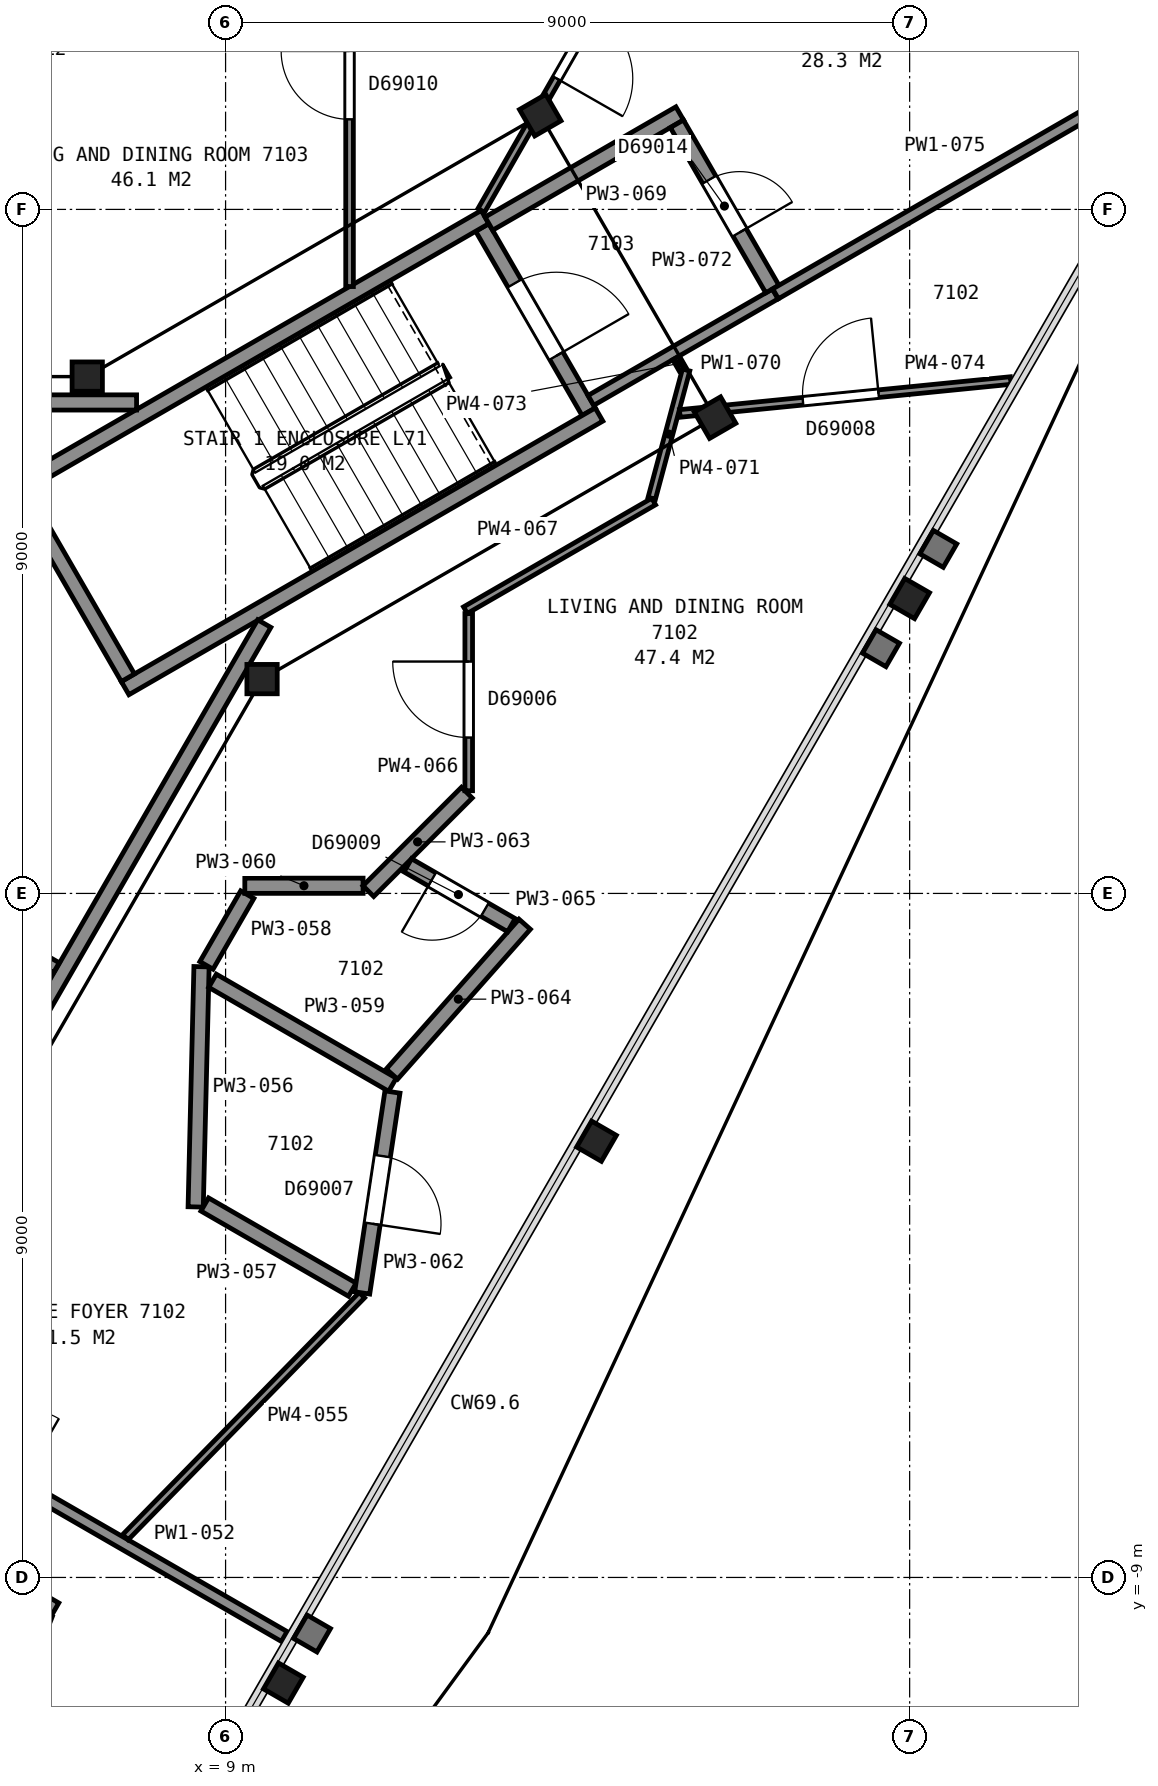
"""IFC4 building model, lengths in metres.
Left out: names, types, materials, properties, quantities, classifications, styles, units other than length and angle.
Written with IfcOpenShell. Run it as: python <this file> out.ifc"""

import sys

from ifc_helpers import new_model, si_unit, direction, frame, frame_2d, origin, origin_2d, place, context, subcontext, project, spatial, rectangle, i_section, extrude, element, fill, save


model = new_model("IFC4")
c1 = context("Model", 3, precision=1e-05, world=origin(), true_north=direction((0.0, 1.0)))
c2 = subcontext(c1, "Body", "Model", "MODEL_VIEW")
j1 = project(units=[si_unit("LENGTHUNIT", "METRE"), si_unit("PLANEANGLEUNIT", "RADIAN")], contexts=[c1])
p1 = place(None, origin())
s1 = spatial("IfcSite", under=j1, at=p1, CompositionType="ELEMENT")
p2 = place(p1, origin())
s2 = spatial("IfcBuilding", under=s1, at=p2, CompositionType="ELEMENT")
p3 = place(p2, frame((0.0, 0.0, 282.5)))
s3 = spatial("IfcBuildingStorey", under=s2, at=p3, CompositionType="ELEMENT", Elevation=282.5)
for number, where, z_axis, x_axis in (
    (1, (9.76, -10.39, 0.0), (0.0, 0.0, 1.0), (-0.5, -0.866, 0.0)),
    (2, (13.88, -3.26, 0.0), (0.0, 0.0, 1.0), (-0.5, -0.866, 0.0)),
    (3, (18.0, 3.88, 0.0), (0.0, 0.0, 1.0), (-0.5, -0.866, 0.0)),
):
    element("IfcColumn", number, at=place(p3, frame(where, z_axis=z_axis, x_axis=x_axis)), inside=s3, PredefinedType="COLUMN", context=c2, shape_type="SweptSolid", body=[
        extrude(i_section(OverallWidth=0.394, OverallDepth=0.376, WebThickness=0.017, FlangeThickness=0.028, FilletRadius=0.015, at=origin_2d()), origin(), (0.0, 0.0, 1.0), 3.7),
    ])
p4 = place(p3, frame((9.48, 2.82, 0.0), z_axis=(0.0, 0.0, 1.0), x_axis=(1.0, 0.0, 0.0)))
e4 = element("IfcColumn", 4, at=p4, inside=s3, PredefinedType="COLUMN", context=c2, shape_type="SweptSolid", body=[
    extrude(i_section(OverallWidth=0.399, OverallDepth=0.386, WebThickness=0.021, FlangeThickness=0.033, FilletRadius=0.015, at=origin_2d()), origin(), (0.0, 0.0, 1.0), 3.7),
])
for number, where, z_axis, x_axis in (
    (5, (15.44, 6.26, 0.0), (0.0, 0.0, 1.0), (0.5, -0.866, 0.0)),
    (6, (13.14, 10.24, 0.0), (0.0, 0.0, 1.0), (0.5, -0.866, 0.0)),
):
    element("IfcColumn", number, at=place(p3, frame(where, z_axis=z_axis, x_axis=x_axis)), inside=s3, PredefinedType="COLUMN", context=c2, shape_type="SweptSolid", body=[
        extrude(i_section(OverallWidth=0.401, OverallDepth=0.399, WebThickness=0.025, FlangeThickness=0.04, FilletRadius=0.015, at=origin_2d()), origin(), (0.0, 0.0, 1.0), 3.7),
    ])
p5 = place(p3, frame((7.18, 6.8, 0.0), z_axis=(0.0, 0.0, 1.0), x_axis=(1.0, 0.0, 0.0)))
e7 = element("IfcColumn", 7, at=p5, inside=s3, PredefinedType="COLUMN", context=c2, shape_type="SweptSolid", body=[
    extrude(i_section(OverallWidth=0.399, OverallDepth=0.386, WebThickness=0.021, FlangeThickness=0.033, FilletRadius=0.015, at=origin_2d()), origin(), (0.0, 0.0, 1.0), 3.7),
])
p6 = place(p3, frame((13.777, 6.338, 0.0), z_axis=(0.0, 0.0, 1.0), x_axis=(-0.500049511043, 0.865996816683, 0.0)))
e8 = element("IfcWall", 8, at=p6, inside=s3, PredefinedType="PARTITIONING", context=c2, shape_type="SweptSolid", body=[
    extrude(rectangle(XDim=2.8, YDim=0.2, at=frame_2d((1.4, 0.0))), origin(), (0.0, 0.0, 1.0), 3.45),
])
p7 = place(p6, frame((0.85, 0.0, 0.0)))
e9 = element("IfcOpeningElement", 9, at=p7, cuts=e8, PredefinedType="OPENING", context=c2, shape_type="SweptSolid", body=[
    extrude(rectangle(XDim=1.1, YDim=2.1, at=frame_2d((0.55, 1.05))), frame((0.0, 0.11, 0.0), z_axis=(0.0, -1.0, 0.0), x_axis=(1.0, 0.0, 0.0)), (0.0, 0.0, 1.0), 0.22),
])
for number, where, z_axis, x_axis in (
    (10, (6.178, 5.299, 0.0), (0.0, 0.0, 1.0), (0.866, 0.5, 0.0)),
    (11, (7.678, 2.701, 0.0), (0.0, 0.0, 1.0), (0.866, 0.5, 0.0)),
):
    element("IfcWall", number, at=place(p3, frame(where, z_axis=z_axis, x_axis=x_axis)), inside=s3, PredefinedType="PARTITIONING", context=c2, shape_type="SweptSolid", body=[
        extrude(rectangle(XDim=7.2, YDim=0.2, at=frame_2d((3.6, 0.0))), origin(), (0.0, 0.0, 1.0), 3.45),
    ])
p8 = place(p3, frame((7.715, 2.838, 0.0), z_axis=(0.0, 0.0, 1.0), x_axis=(-0.500049511043, 0.865996816683, 0.0)))
e12 = element("IfcWall", 12, at=p8, inside=s3, PredefinedType="PARTITIONING", context=c2, shape_type="SweptSolid", body=[
    extrude(rectangle(XDim=2.8, YDim=0.2, at=frame_2d((1.4, 0.0))), origin(), (0.0, 0.0, 1.0), 3.45),
])
p9 = place(p3, frame((7.829, 6.46, 0.0), z_axis=(0.0, 0.0, 1.0), x_axis=(-1.0, 0.0, 0.0)))
e13 = element("IfcWall", 13, at=p9, inside=s3, PredefinedType="PARTITIONING", context=c2, shape_type="SweptSolid", body=[
    extrude(rectangle(XDim=15.658, YDim=0.2, at=frame_2d((7.829, 0.0))), origin(), (0.0, 0.0, 1.0), 3.45),
])
p10 = place(p9, frame((12.168, 0.0, 0.0)))
e14 = element("IfcOpeningElement", 14, at=p10, cuts=e13, PredefinedType="OPENING", context=c2, shape_type="SweptSolid", body=[
    extrude(rectangle(XDim=1.2, YDim=2.1, at=frame_2d((0.6, 1.05))), frame((0.0, 0.11, 0.0), z_axis=(0.0, -1.0, 0.0), x_axis=(1.0, 0.0, 0.0)), (0.0, 0.0, 1.0), 0.22),
])
p11 = place(p3, frame((3.828, -6.29, 0.0), z_axis=(0.0, 0.0, 1.0), x_axis=(0.499979739078, 0.866037101117, 0.0)))
e15 = element("IfcWall", 15, at=p11, inside=s3, PredefinedType="PARTITIONING", context=c2, shape_type="SweptSolid", body=[
    extrude(rectangle(XDim=11.363, YDim=0.2, at=frame_2d((5.681, 0.0))), origin(), (0.0, 0.0, 1.0), 3.45),
])
p12 = place(p11, frame((0.55, 0.0, 0.0)))
e16 = element("IfcOpeningElement", 16, at=p12, cuts=e15, PredefinedType="OPENING", context=c2, shape_type="SweptSolid", body=[
    extrude(rectangle(XDim=1.2, YDim=2.1, at=frame_2d((0.6, 1.05))), frame((0.0, 0.11, 0.0), z_axis=(0.0, -1.0, 0.0), x_axis=(1.0, 0.0, 0.0)), (0.0, 0.0, 1.0), 0.22),
])
p13 = place(p3, frame((6.774, -0.978, 0.0), z_axis=(0.0, 0.0, 1.0), x_axis=(-0.866062920605, 0.499935013329, 0.0)))
e17 = element("IfcWall", 17, at=p13, inside=s3, PredefinedType="PARTITIONING", context=c2, shape_type="SweptSolid", body=[
    extrude(rectangle(XDim=2.22, YDim=0.15, at=frame_2d((1.11, 0.0))), origin(), (0.0, 0.0, 1.0), 3.45),
])
p14 = place(p13, frame((0.646, 0.0, 0.0)))
e18 = element("IfcOpeningElement", 18, at=p14, cuts=e17, PredefinedType="OPENING", context=c2, shape_type="SweptSolid", body=[
    extrude(rectangle(XDim=0.9, YDim=2.1, at=frame_2d((0.45, 1.05))), frame((0.0, 0.085, 0.0), z_axis=(0.0, -1.0, 0.0), x_axis=(1.0, 0.0, 0.0)), (0.0, 0.0, 1.0), 0.17),
])
p15 = place(p3, frame((3.498, -7.541, 0.0), z_axis=(0.0, 0.0, 1.0), x_axis=(0.865985624761, -0.500068892961, 0.0)))
e19 = element("IfcWall", 19, at=p15, inside=s3, PredefinedType="PARTITIONING", context=c2, shape_type="SweptSolid", body=[
    extrude(rectangle(XDim=3.762, YDim=0.2, at=frame_2d((1.881, 0.0))), origin(), (0.0, 0.0, 1.0), 2.723),
])
p16 = place(p3, frame((9.772, -9.777, 0.0), z_axis=(0.0, 0.0, 1.0), x_axis=(-0.866083818164, 0.499898809675, 0.0)))
e20 = element("IfcWall", 20, at=p16, inside=s3, PredefinedType="PARTITIONING", context=c2, shape_type="SweptSolid", body=[
    extrude(rectangle(XDim=6.551, YDim=0.15, at=frame_2d((3.275, 0.0))), origin(), (0.0, 0.0, 1.0), 2.723),
])
p17 = place(p16, frame((4.001, 0.0, 0.0)))
e21 = element("IfcOpeningElement", 21, at=p17, cuts=e20, PredefinedType="OPENING", context=c2, shape_type="SweptSolid", body=[
    extrude(rectangle(XDim=1.0, YDim=2.1, at=frame_2d((0.5, 1.05))), frame((0.0, 0.085, 0.0), z_axis=(0.0, -1.0, 0.0), x_axis=(1.0, 0.0, 0.0)), (0.0, 0.0, 1.0), 0.17),
])
p18 = place(p3, frame((5.526, -12.29, 0.0), z_axis=(0.0, 0.0, 1.0), x_axis=(0.364786545928, 0.931091174864, 0.0)))
e22 = element("IfcWall", 22, at=p18, inside=s3, PredefinedType="PARTITIONING", context=c2, shape_type="SweptSolid", body=[
    extrude(rectangle(XDim=3.019, YDim=0.2, at=frame_2d((1.51, 0.0))), origin(), (0.0, 0.0, 1.0), 2.723),
])
p19 = place(p3, frame((7.682, -8.47, 0.0), z_axis=(0.0, 0.0, 1.0), x_axis=(0.698777378461, 0.715339203002, 0.0)))
e23 = element("IfcWall", 23, at=p19, inside=s3, PredefinedType="PARTITIONING", context=c2, shape_type="SweptSolid", body=[
    extrude(rectangle(XDim=4.452, YDim=0.1, at=frame_2d((2.226, 0.0))), origin(), (0.0, 0.0, 1.0), 2.723),
])
p20 = place(p3, frame((8.607, -4.125, 0.0), z_axis=(0.0, 0.0, 1.0), x_axis=(0.024245593124, 0.999706032399, 0.0)))
e24 = element("IfcWall", 24, at=p20, inside=s3, PredefinedType="PARTITIONING", context=c2, shape_type="SweptSolid", body=[
    extrude(rectangle(XDim=3.162, YDim=0.2, at=frame_2d((1.581, 0.0))), origin(), (0.0, 0.0, 1.0), 2.723),
])
p21 = place(p3, frame((8.726, -4.093, 0.0), z_axis=(0.0, 0.0, 1.0), x_axis=(0.866056839033, -0.499945548598, 0.0)))
e25 = element("IfcWall", 25, at=p21, inside=s3, PredefinedType="PARTITIONING", context=c2, shape_type="SweptSolid", body=[
    extrude(rectangle(XDim=2.242, YDim=0.2, at=frame_2d((1.121, 0.0))), origin(), (0.0, 0.0, 1.0), 2.723),
])
p22 = place(p3, frame((8.749, -0.947, 0.0), z_axis=(0.0, 0.0, 1.0), x_axis=(0.499656913366, 0.866223394354, 0.0)))
e26 = element("IfcWall", 26, at=p22, inside=s3, PredefinedType="PARTITIONING", context=c2, shape_type="SweptSolid", body=[
    extrude(rectangle(XDim=1.075, YDim=0.2, at=frame_2d((0.538, 0.0))), origin(), (0.0, 0.0, 1.0), 2.723),
])
p23 = place(p3, frame((8.828, -1.149, 0.0), z_axis=(0.0, 0.0, 1.0), x_axis=(0.865853899269, -0.50029693695, 0.0)))
e27 = element("IfcWall", 27, at=p23, inside=s3, PredefinedType="PARTITIONING", context=c2, shape_type="SweptSolid", body=[
    extrude(rectangle(XDim=2.734, YDim=0.2, at=frame_2d((1.367, 0.0))), origin(), (0.0, 0.0, 1.0), 2.723),
])
p24 = place(p3, frame((9.253, 0.101, 0.0), z_axis=(0.0, 0.0, 1.0), x_axis=(1.0, 0.0, 0.0)))
e28 = element("IfcWall", 28, at=p24, inside=s3, PredefinedType="PARTITIONING", context=c2, shape_type="SweptSolid", body=[
    extrude(rectangle(XDim=1.556, YDim=0.2, at=frame_2d((0.778, 0.0))), origin(), (0.0, 0.0, 1.0), 2.723),
])
p25 = place(p3, frame((10.631, 13.351, 0.0), z_axis=(0.0, 0.0, 1.0), x_axis=(0.0, -1.0, 0.0)))
e29 = element("IfcWall", 29, at=p25, inside=s3, PredefinedType="PARTITIONING", context=c2, shape_type="SweptSolid", body=[
    extrude(rectangle(XDim=5.366, YDim=0.1, at=frame_2d((2.683, 0.0))), origin(), (0.0, 0.0, 1.0), 2.723),
])
p26 = place(p25, frame((2.266, 0.0, 0.0)))
e30 = element("IfcOpeningElement", 30, at=p26, cuts=e29, PredefinedType="OPENING", context=c2, shape_type="SweptSolid", body=[
    extrude(rectangle(XDim=0.9, YDim=2.1, at=frame_2d((0.45, 1.05))), frame((0.0, 0.06, 0.0), z_axis=(0.0, -1.0, 0.0), x_axis=(1.0, 0.0, 0.0)), (0.0, 0.0, 1.0), 0.12),
])
p27 = place(p3, frame((10.797, -5.256, 0.0), z_axis=(0.0, 0.0, 1.0), x_axis=(0.148961207986, 0.988843040384, 0.0)))
e31 = element("IfcWall", 31, at=p27, inside=s3, PredefinedType="PARTITIONING", context=c2, shape_type="SweptSolid", body=[
    extrude(rectangle(XDim=2.673, YDim=0.2, at=frame_2d((1.336, 0.0))), origin(), (0.0, 0.0, 1.0), 2.723),
])
p28 = place(p27, frame((0.92, 0.0, 0.0)))
e32 = element("IfcOpeningElement", 32, at=p28, cuts=e31, PredefinedType="OPENING", context=c2, shape_type="SweptSolid", body=[
    extrude(rectangle(XDim=0.9, YDim=2.1, at=frame_2d((0.45, 1.05))), frame((0.0, 0.11, 0.0), z_axis=(0.0, -1.0, 0.0), x_axis=(1.0, 0.0, 0.0)), (0.0, 0.0, 1.0), 0.22),
])
p29 = place(p3, frame((10.878, 0.03, 0.0), z_axis=(0.0, 0.0, 1.0), x_axis=(0.707173379423, 0.707040176677, 0.0)))
e33 = element("IfcWall", 33, at=p29, inside=s3, PredefinedType="PARTITIONING", context=c2, shape_type="SweptSolid", body=[
    extrude(rectangle(XDim=1.833, YDim=0.2, at=frame_2d((0.917, 0.0))), origin(), (0.0, 0.0, 1.0), 2.723),
])
p30 = place(p3, frame((11.188, -2.377, 0.0), z_axis=(0.0, 0.0, 1.0), x_axis=(0.663045631266, 0.748578981043, 0.0)))
e34 = element("IfcWall", 34, at=p30, inside=s3, PredefinedType="PARTITIONING", context=c2, shape_type="SweptSolid", body=[
    extrude(rectangle(XDim=2.635, YDim=0.2, at=frame_2d((1.317, 0.0))), origin(), (0.0, 0.0, 1.0), 2.723),
])
p31 = place(p3, frame((12.761, -0.417, 0.0), z_axis=(0.0, 0.0, 1.0), x_axis=(-0.866030680601, 0.499990860175, 0.0)))
e35 = element("IfcWall", 35, at=p31, inside=s3, PredefinedType="PARTITIONING", context=c2, shape_type="SweptSolid", body=[
    extrude(rectangle(XDim=1.575, YDim=0.2, at=frame_2d((0.787, 0.0))), origin(), (0.0, 0.0, 1.0), 2.723),
])
p32 = place(p31, frame((0.405, 0.0, 0.0)))
e36 = element("IfcOpeningElement", 36, at=p32, cuts=e35, PredefinedType="OPENING", context=c2, shape_type="SweptSolid", body=[
    extrude(rectangle(XDim=0.8, YDim=2.1, at=frame_2d((0.4, 1.05))), frame((0.0, 0.11, 0.0), z_axis=(0.0, -1.0, 0.0), x_axis=(1.0, 0.0, 0.0)), (0.0, 0.0, 1.0), 0.22),
])
p33 = place(p3, frame((12.199, 3.682, 0.0), z_axis=(0.0, 0.0, 1.0), x_axis=(0.0, -1.0, 0.0)))
e37 = element("IfcWall", 37, at=p33, inside=s3, PredefinedType="PARTITIONING", context=c2, shape_type="SweptSolid", body=[
    extrude(rectangle(XDim=2.331, YDim=0.1, at=frame_2d((1.166, 0.0))), origin(), (0.0, 0.0, 1.0), 2.723),
])
p34 = place(p33, frame((0.631, 0.0, 0.0)))
e38 = element("IfcOpeningElement", 38, at=p34, cuts=e37, PredefinedType="OPENING", context=c2, shape_type="SweptSolid", body=[
    extrude(rectangle(XDim=1.0, YDim=2.1, at=frame_2d((0.5, 1.05))), frame((0.0, 0.06, 0.0), z_axis=(0.0, -1.0, 0.0), x_axis=(1.0, 0.0, 0.0)), (0.0, 0.0, 1.0), 0.12),
])
p35 = place(p3, frame((12.156, 3.727, 0.0), z_axis=(0.0, 0.0, 1.0), x_axis=(0.866012137121, 0.500022977831, 0.0)))
e39 = element("IfcWall", 39, at=p35, inside=s3, PredefinedType="PARTITIONING", context=c2, shape_type="SweptSolid", body=[
    extrude(rectangle(XDim=2.86, YDim=0.1, at=frame_2d((1.43, 0.0))), origin(), (0.0, 0.0, 1.0), 2.723),
])
p36 = place(p3, frame((14.868, 13.362, 0.0), z_axis=(0.0, 0.0, 1.0), x_axis=(-0.496681239155, -0.867933031214, 0.0)))
e40 = element("IfcWall", 40, at=p36, inside=s3, PredefinedType="PARTITIONING", context=c2, shape_type="SweptSolid", body=[
    extrude(rectangle(XDim=5.041, YDim=0.1, at=frame_2d((2.521, 0.0))), origin(), (0.0, 0.0, 1.0), 2.723),
])
p37 = place(p36, frame((2.041, 0.0, 0.0)))
e41 = element("IfcOpeningElement", 41, at=p37, cuts=e40, PredefinedType="OPENING", context=c2, shape_type="SweptSolid", body=[
    extrude(rectangle(XDim=1.0, YDim=2.1, at=frame_2d((0.5, 1.05))), frame((0.0, 0.06, 0.0), z_axis=(0.0, -1.0, 0.0), x_axis=(1.0, 0.0, 0.0)), (0.0, 0.0, 1.0), 0.12),
])
p38 = place(p3, frame((12.464, 8.813, 0.0), z_axis=(0.0, 0.0, 1.0), x_axis=(0.865948555758, 0.50013308107, 0.0)))
e42 = element("IfcWall", 42, at=p38, inside=s3, PredefinedType="PARTITIONING", context=c2, shape_type="SweptSolid", body=[
    extrude(rectangle(XDim=2.899, YDim=0.2, at=frame_2d((1.45, 0.0))), origin(), (0.0, 0.0, 1.0), 2.723),
])
p39 = place(p3, frame((13.806, 6.487, 0.0), z_axis=(0.0, 0.0, 1.0), x_axis=(0.866056369097, 0.49994636267, 0.0)))
e43 = element("IfcWall", 43, at=p39, inside=s3, PredefinedType="PARTITIONING", context=c2, shape_type="SweptSolid", body=[
    extrude(rectangle(XDim=2.8, YDim=0.15, at=frame_2d((1.4, 0.0))), origin(), (0.0, 0.0, 1.0), 2.723),
])
p40 = place(p3, frame((14.607, 5.2, 0.0), z_axis=(0.0, 0.0, 1.0), x_axis=(0.258549793661, 0.965997931777, 0.0)))
e44 = element("IfcWall", 44, at=p40, inside=s3, PredefinedType="PARTITIONING", context=c2, shape_type="SweptSolid", body=[
    extrude(rectangle(XDim=1.747, YDim=0.1, at=frame_2d((0.874, 0.0))), origin(), (0.0, 0.0, 1.0), 2.723),
])
p41 = place(p3, frame((16.194, 7.952, 0.0), z_axis=(0.0, 0.0, 1.0), x_axis=(-0.500039460523, 0.866002620042, 0.0)))
e45 = element("IfcWall", 45, at=p41, inside=s3, PredefinedType="PARTITIONING", context=c2, shape_type="SweptSolid", body=[
    extrude(rectangle(XDim=2.511, YDim=0.2, at=frame_2d((1.255, 0.0))), origin(), (0.0, 0.0, 1.0), 2.723),
])
p42 = place(p41, frame((0.861, 0.0, 0.0)))
e46 = element("IfcOpeningElement", 46, at=p42, cuts=e45, PredefinedType="OPENING", context=c2, shape_type="SweptSolid", body=[
    extrude(rectangle(XDim=0.8, YDim=2.1, at=frame_2d((0.4, 1.05))), frame((0.0, 0.11, 0.0), z_axis=(0.0, -1.0, 0.0), x_axis=(1.0, 0.0, 0.0)), (0.0, 0.0, 1.0), 0.22),
])
p43 = place(p3, frame((14.927, 7.047, 0.0), z_axis=(0.0, 0.0, 1.0), x_axis=(0.497687197367, -0.867356589631, 0.0)))
e47 = element("IfcWall", 47, at=p43, inside=s3, PredefinedType="PARTITIONING", context=c2, shape_type="SweptSolid", body=[
    extrude(rectangle(XDim=0.17, YDim=0.1, at=frame_2d((0.085, 0.0))), origin(), (0.0, 0.0, 1.0), 2.723),
])
p44 = place(p3, frame((14.976, 6.315, 0.0), z_axis=(0.0, 0.0, 1.0), x_axis=(0.995082940066, 0.09904515329, 0.0)))
e48 = element("IfcWall", 48, at=p44, inside=s3, PredefinedType="PARTITIONING", context=c2, shape_type="SweptSolid", body=[
    extrude(rectangle(XDim=4.375, YDim=0.1, at=frame_2d((2.188, 0.0))), origin(), (0.0, 0.0, 1.0), 2.723),
])
p45 = place(p44, frame((1.628, 0.0, 0.0)))
e49 = element("IfcOpeningElement", 49, at=p45, cuts=e48, PredefinedType="OPENING", context=c2, shape_type="SweptSolid", body=[
    extrude(rectangle(XDim=1.0, YDim=2.1, at=frame_2d((0.5, 1.05))), frame((0.0, 0.06, 0.0), z_axis=(0.0, -1.0, 0.0), x_axis=(1.0, 0.0, 0.0)), (0.0, 0.0, 1.0), 0.12),
])
p46 = place(p3, frame((16.236, 7.889, 0.0), z_axis=(0.0, 0.0, 1.0), x_axis=(0.865995456094, 0.500051867335, 0.0)))
e50 = element("IfcWall", 50, at=p46, inside=s3, PredefinedType="PARTITIONING", context=c2, shape_type="SweptSolid", body=[
    extrude(rectangle(XDim=6.415, YDim=0.15, at=frame_2d((3.208, 0.0))), origin(), (0.0, 0.0, 1.0), 2.723),
])
p47 = place(p7, origin())
e51 = element("IfcDoor", 51, at=p47, inside=s3, OperationType="SINGLE_SWING_LEFT", PredefinedType="DOOR", context=c2, shape_type="SweptSolid", body=[
    extrude(rectangle(XDim=1.1, YDim=2.1, at=frame_2d((0.55, 1.05))), frame((0.0, 0.025, 0.0), z_axis=(0.0, -1.0, 0.0), x_axis=(1.0, 0.0, 0.0)), (0.0, 0.0, 1.0), 0.05),
])
fill(e9, e51)
p48 = place(p26, origin())
e52 = element("IfcDoor", 52, at=p48, inside=s3, OperationType="SINGLE_SWING_LEFT", PredefinedType="DOOR", context=c2, shape_type="SweptSolid", body=[
    extrude(rectangle(XDim=0.9, YDim=2.1, at=frame_2d((0.45, 1.05))), frame((0.0, 0.025, 0.0), z_axis=(0.0, -1.0, 0.0), x_axis=(1.0, 0.0, 0.0)), (0.0, 0.0, 1.0), 0.05),
])
fill(e30, e52)
p49 = place(p28, origin())
e53 = element("IfcDoor", 53, at=p49, inside=s3, OperationType="SINGLE_SWING_LEFT", PredefinedType="DOOR", context=c2, shape_type="SweptSolid", body=[
    extrude(rectangle(XDim=0.9, YDim=2.1, at=frame_2d((0.45, 1.05))), frame((0.0, 0.025, 0.0), z_axis=(0.0, -1.0, 0.0), x_axis=(1.0, 0.0, 0.0)), (0.0, 0.0, 1.0), 0.05),
])
fill(e32, e53)
p50 = place(p32, origin())
e54 = element("IfcDoor", 54, at=p50, inside=s3, OperationType="SINGLE_SWING_RIGHT", PredefinedType="DOOR", context=c2, shape_type="SweptSolid", body=[
    extrude(rectangle(XDim=0.8, YDim=2.1, at=frame_2d((0.4, 1.05))), frame((0.0, 0.025, 0.0), z_axis=(0.0, -1.0, 0.0), x_axis=(1.0, 0.0, 0.0)), (0.0, 0.0, 1.0), 0.05),
])
fill(e36, e54)
p51 = place(p34, origin())
e55 = element("IfcDoor", 55, at=p51, inside=s3, OperationType="SINGLE_SWING_LEFT", PredefinedType="DOOR", context=c2, shape_type="SweptSolid", body=[
    extrude(rectangle(XDim=1.0, YDim=2.1, at=frame_2d((0.5, 1.05))), frame((0.0, 0.025, 0.0), z_axis=(0.0, -1.0, 0.0), x_axis=(1.0, 0.0, 0.0)), (0.0, 0.0, 1.0), 0.05),
])
fill(e38, e55)
p52 = place(p37, origin())
e56 = element("IfcDoor", 56, at=p52, inside=s3, OperationType="SINGLE_SWING_RIGHT", PredefinedType="DOOR", context=c2, shape_type="SweptSolid", body=[
    extrude(rectangle(XDim=1.0, YDim=2.1, at=frame_2d((0.5, 1.05))), frame((0.0, 0.025, 0.0), z_axis=(0.0, -1.0, 0.0), x_axis=(1.0, 0.0, 0.0)), (0.0, 0.0, 1.0), 0.05),
])
fill(e41, e56)
p53 = place(p42, origin())
e57 = element("IfcDoor", 57, at=p53, inside=s3, OperationType="SINGLE_SWING_LEFT", PredefinedType="DOOR", context=c2, shape_type="SweptSolid", body=[
    extrude(rectangle(XDim=0.8, YDim=2.1, at=frame_2d((0.4, 1.05))), frame((0.0, 0.025, 0.0), z_axis=(0.0, -1.0, 0.0), x_axis=(1.0, 0.0, 0.0)), (0.0, 0.0, 1.0), 0.05),
])
fill(e46, e57)
p54 = place(p45, origin())
e58 = element("IfcDoor", 58, at=p54, inside=s3, OperationType="SINGLE_SWING_RIGHT", PredefinedType="DOOR", context=c2, shape_type="SweptSolid", body=[
    extrude(rectangle(XDim=1.0, YDim=2.1, at=frame_2d((0.5, 1.05))), frame((0.0, 0.025, 0.0), z_axis=(0.0, -1.0, 0.0), x_axis=(1.0, 0.0, 0.0)), (0.0, 0.0, 1.0), 0.05),
])
fill(e49, e58)
save(model, sys.argv[1])
